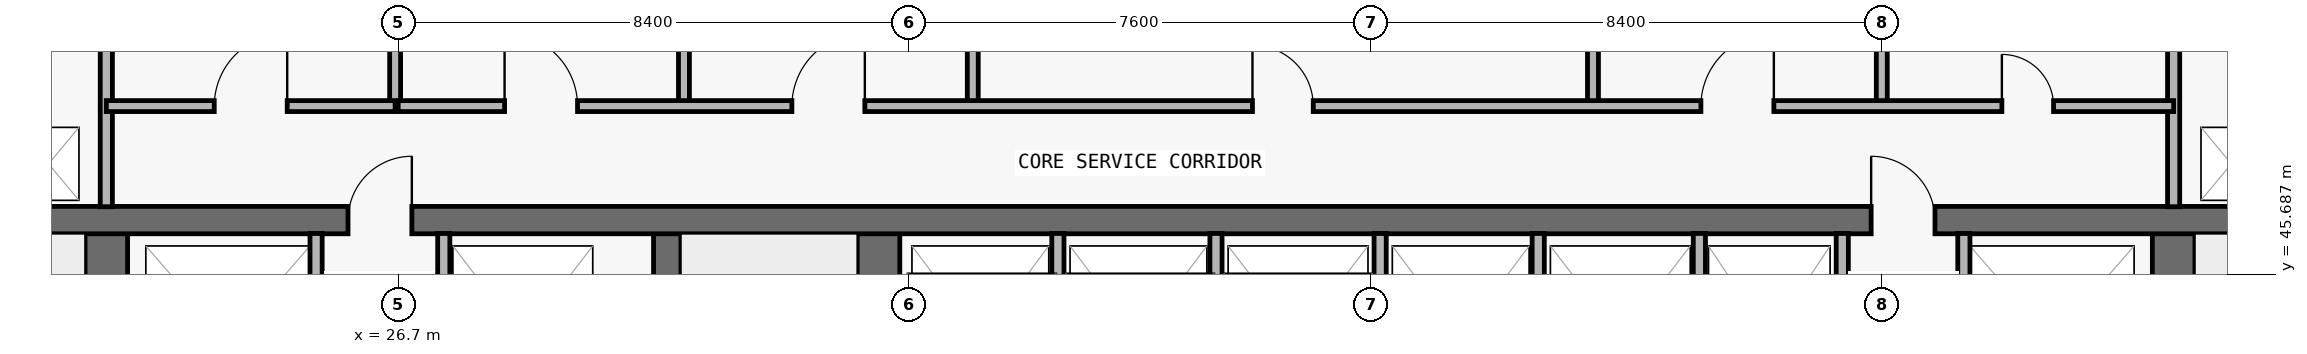
"""IFC4 building model, lengths in metres.
Left out: names, types, materials, properties, quantities, classifications, styles, units other than length and angle.
Written with IfcOpenShell. Run it as: python <this file> out.ifc"""

import sys

from ifc_helpers import new_model, si_unit, direction, frame, frame_2d, origin, place, context, subcontext, project, spatial, rectangle, extrude, element, fill, save


model = new_model("IFC4")
c1 = context("Model", 3, precision=1e-05, world=origin(), true_north=direction((0.0, 1.0)))
c2 = subcontext(c1, "Body", "Model", "MODEL_VIEW")
j1 = project(units=[si_unit("LENGTHUNIT", "METRE"), si_unit("PLANEANGLEUNIT", "RADIAN")], contexts=[c1])
p1 = place(None, origin())
s1 = spatial("IfcSite", under=j1, at=p1, CompositionType="ELEMENT")
p2 = place(p1, origin())
s2 = spatial("IfcBuilding", under=s1, at=p2, CompositionType="ELEMENT")
p3 = place(p2, frame((0.0, 0.0, 24.6)))
s3 = spatial("IfcBuildingStorey", under=s2, at=p3, CompositionType="ELEMENT", Elevation=24.6)
p4 = place(p3, frame((21.9, 36.9, 0.0), z_axis=(0.0, 0.0, 1.0), x_axis=(0.0, 1.0, 0.0)))
e1 = element("IfcWall", 1, at=p4, inside=s3, PredefinedType="SHEAR", context=c2, shape_type="SweptSolid", body=[
    extrude(rectangle(XDim=9.675, YDim=0.7, at=frame_2d((4.837, 0.0))), origin(), (0.0, 0.0, 1.0), 5.15),
])
p5 = place(p4, frame((0.65, 0.0, 0.0)))
e2 = element("IfcOpeningElement", 2, at=p5, cuts=e1, PredefinedType="OPENING", context=c2, shape_type="SweptSolid", body=[
    extrude(rectangle(XDim=1.1, YDim=2.15, at=frame_2d((0.55, 1.075))), frame((0.0, 0.36, 0.0), z_axis=(0.0, -1.0, 0.0), x_axis=(1.0, 0.0, 0.0)), (0.0, 0.0, 1.0), 0.72),
])
p6 = place(p3, frame((55.9, 36.9, 0.0), z_axis=(0.0, 0.0, 1.0), x_axis=(0.0, 1.0, 0.0)))
e3 = element("IfcWall", 3, at=p6, inside=s3, PredefinedType="SHEAR", context=c2, shape_type="SweptSolid", body=[
    extrude(rectangle(XDim=9.675, YDim=0.7, at=frame_2d((4.837, 0.0))), origin(), (0.0, 0.0, 1.0), 5.15),
])
p7 = place(p6, frame((0.65, 0.0, 0.0)))
e4 = element("IfcOpeningElement", 4, at=p7, cuts=e3, PredefinedType="OPENING", context=c2, shape_type="SweptSolid", body=[
    extrude(rectangle(XDim=1.1, YDim=2.15, at=frame_2d((0.55, 1.075))), frame((0.0, 0.36, 0.0), z_axis=(0.0, -1.0, 0.0), x_axis=(1.0, 0.0, 0.0)), (0.0, 0.0, 1.0), 0.72),
])
p8 = place(p3, frame((31.125, 36.9, 0.0), z_axis=(0.0, 0.0, 1.0), x_axis=(0.0, 1.0, 0.0)))
e5 = element("IfcWall", 5, at=p8, inside=s3, PredefinedType="SHEAR", context=c2, shape_type="SweptSolid", body=[
    extrude(rectangle(XDim=9.675, YDim=0.45, at=frame_2d((4.837, 0.0))), origin(), (0.0, 0.0, 1.0), 5.15),
])
p9 = place(p3, frame((34.6, 36.9, 0.0), z_axis=(0.0, 0.0, 1.0), x_axis=(0.0, 1.0, 0.0)))
e6 = element("IfcWall", 6, at=p9, inside=s3, PredefinedType="SHEAR", context=c2, shape_type="SweptSolid", body=[
    extrude(rectangle(XDim=9.675, YDim=0.7, at=frame_2d((4.837, 0.0))), origin(), (0.0, 0.0, 1.0), 5.15),
])
p10 = place(p3, frame((18.2, 46.575, 0.0), z_axis=(0.0, 0.0, 1.0), x_axis=(1.0, 0.0, 0.0)))
e7 = element("IfcWall", 7, at=p10, inside=s3, PredefinedType="SHEAR", context=c2, shape_type="SweptSolid", body=[
    extrude(rectangle(XDim=41.4, YDim=0.45, at=frame_2d((20.7, 0.0))), origin(), (0.0, 0.0, 1.0), 5.15),
])
p11 = place(p10, frame((7.675, 0.0, 0.0)))
e8 = element("IfcOpeningElement", 8, at=p11, cuts=e7, PredefinedType="OPENING", context=c2, shape_type="SweptSolid", body=[
    extrude(rectangle(XDim=1.05, YDim=2.15, at=frame_2d((0.525, 1.075))), frame((0.0, 0.235, 0.0), z_axis=(0.0, -1.0, 0.0), x_axis=(1.0, 0.0, 0.0)), (0.0, 0.0, 1.0), 0.47),
])
p12 = place(p10, frame((32.725, 0.0, 0.0)))
e9 = element("IfcOpeningElement", 9, at=p12, cuts=e7, PredefinedType="OPENING", context=c2, shape_type="SweptSolid", body=[
    extrude(rectangle(XDim=1.05, YDim=2.15, at=frame_2d((0.525, 1.075))), frame((0.0, 0.235, 0.0), z_axis=(0.0, -1.0, 0.0), x_axis=(1.0, 0.0, 0.0)), (0.0, 0.0, 1.0), 0.47),
])
p13 = place(p3, frame((21.9, 46.795, 0.0), z_axis=(0.0, 0.0, 1.0), x_axis=(0.0, 1.0, 0.0)))
e10 = element("IfcWall", 10, at=p13, inside=s3, PredefinedType="PARTITIONING", context=c2, shape_type="SweptSolid", body=[
    extrude(rectangle(XDim=3.06, YDim=0.2, at=frame_2d((1.53, 0.0))), origin(), (0.0, 0.0, 1.0), 5.15),
])
p14 = place(p3, frame((25.35, 43.17, 0.0), z_axis=(0.0, 0.0, 1.0), x_axis=(0.0, 1.0, 0.0)))
e11 = element("IfcWall", 11, at=p14, inside=s3, PredefinedType="PARTITIONING", context=c2, shape_type="SweptSolid", body=[
    extrude(rectangle(XDim=3.185, YDim=0.2, at=frame_2d((1.593, 0.0))), origin(), (0.0, 0.0, 1.0), 5.15),
])
p15 = place(p3, frame((26.65, 48.45, 0.0), z_axis=(0.0, 0.0, 1.0), x_axis=(0.0, 1.0, 0.0)))
e12 = element("IfcWall", 12, at=p15, inside=s3, PredefinedType="PARTITIONING", context=c2, shape_type="SweptSolid", body=[
    extrude(rectangle(XDim=1.405, YDim=0.18, at=frame_2d((0.703, 0.0))), origin(), (0.0, 0.0, 1.0), 5.15),
])
p16 = place(p3, frame((27.45, 43.17, 0.0), z_axis=(0.0, 0.0, 1.0), x_axis=(0.0, 1.0, 0.0)))
e13 = element("IfcWall", 13, at=p16, inside=s3, PredefinedType="PARTITIONING", context=c2, shape_type="SweptSolid", body=[
    extrude(rectangle(XDim=3.185, YDim=0.2, at=frame_2d((1.593, 0.0))), origin(), (0.0, 0.0, 1.0), 5.15),
])
for number, where, z_axis, x_axis in (
    (14, (31.4, 48.45, 0.0), (0.0, 0.0, 1.0), (0.0, 1.0, 0.0)),
    (15, (36.15, 48.45, 0.0), (0.0, 0.0, 1.0), (0.0, 1.0, 0.0)),
):
    element("IfcWall", number, at=place(p3, frame(where, z_axis=z_axis, x_axis=x_axis)), inside=s3, PredefinedType="PARTITIONING", context=c2, shape_type="SweptSolid", body=[
        extrude(rectangle(XDim=1.405, YDim=0.18, at=frame_2d((0.703, 0.0))), origin(), (0.0, 0.0, 1.0), 5.15),
    ])
for number, where, z_axis, x_axis in (
    (16, (37.55, 43.17, 0.0), (0.0, 0.0, 1.0), (0.0, 1.0, 0.0)),
    (17, (40.15, 43.17, 0.0), (0.0, 0.0, 1.0), (0.0, 1.0, 0.0)),
    (18, (42.85, 43.17, 0.0), (0.0, 0.0, 1.0), (0.0, 1.0, 0.0)),
    (19, (45.45, 43.17, 0.0), (0.0, 0.0, 1.0), (0.0, 1.0, 0.0)),
):
    element("IfcWall", number, at=place(p3, frame(where, z_axis=z_axis, x_axis=x_axis)), inside=s3, PredefinedType="PARTITIONING", context=c2, shape_type="SweptSolid", body=[
        extrude(rectangle(XDim=3.185, YDim=0.2, at=frame_2d((1.593, 0.0))), origin(), (0.0, 0.0, 1.0), 5.15),
    ])
p17 = place(p3, frame((46.35, 48.45, 0.0), z_axis=(0.0, 0.0, 1.0), x_axis=(0.0, 1.0, 0.0)))
e20 = element("IfcWall", 20, at=p17, inside=s3, PredefinedType="PARTITIONING", context=c2, shape_type="SweptSolid", body=[
    extrude(rectangle(XDim=1.405, YDim=0.18, at=frame_2d((0.703, 0.0))), origin(), (0.0, 0.0, 1.0), 5.15),
])
for number, where, z_axis, x_axis in (
    (21, (48.1, 43.17, 0.0), (0.0, 0.0, 1.0), (0.0, 1.0, 0.0)),
    (22, (50.45, 43.17, 0.0), (0.0, 0.0, 1.0), (0.0, 1.0, 0.0)),
):
    element("IfcWall", number, at=place(p3, frame(where, z_axis=z_axis, x_axis=x_axis)), inside=s3, PredefinedType="PARTITIONING", context=c2, shape_type="SweptSolid", body=[
        extrude(rectangle(XDim=3.185, YDim=0.2, at=frame_2d((1.593, 0.0))), origin(), (0.0, 0.0, 1.0), 5.15),
    ])
p18 = place(p3, frame((51.1, 48.45, 0.0), z_axis=(0.0, 0.0, 1.0), x_axis=(0.0, 1.0, 0.0)))
e23 = element("IfcWall", 23, at=p18, inside=s3, PredefinedType="PARTITIONING", context=c2, shape_type="SweptSolid", body=[
    extrude(rectangle(XDim=1.405, YDim=0.18, at=frame_2d((0.703, 0.0))), origin(), (0.0, 0.0, 1.0), 5.15),
])
p19 = place(p3, frame((52.45, 43.17, 0.0), z_axis=(0.0, 0.0, 1.0), x_axis=(0.0, 1.0, 0.0)))
e24 = element("IfcWall", 24, at=p19, inside=s3, PredefinedType="PARTITIONING", context=c2, shape_type="SweptSolid", body=[
    extrude(rectangle(XDim=3.185, YDim=0.2, at=frame_2d((1.593, 0.0))), origin(), (0.0, 0.0, 1.0), 5.15),
])
p20 = place(p3, frame((55.9, 46.795, 0.0), z_axis=(0.0, 0.0, 1.0), x_axis=(0.0, 1.0, 0.0)))
e25 = element("IfcWall", 25, at=p20, inside=s3, PredefinedType="PARTITIONING", context=c2, shape_type="SweptSolid", body=[
    extrude(rectangle(XDim=3.06, YDim=0.2, at=frame_2d((1.53, 0.0))), origin(), (0.0, 0.0, 1.0), 5.15),
])
p21 = place(p3, frame((21.9, 48.45, 0.0), z_axis=(0.0, 0.0, 1.0), x_axis=(1.0, 0.0, 0.0)))
e26 = element("IfcWall", 26, at=p21, inside=s3, PredefinedType="PARTITIONING", context=c2, shape_type="SweptSolid", body=[
    extrude(rectangle(XDim=4.75, YDim=0.18, at=frame_2d((2.375, 0.0))), origin(), (0.0, 0.0, 1.0), 5.15),
])
p22 = place(p21, frame((1.775, 0.0, 0.0)))
e27 = element("IfcOpeningElement", 27, at=p22, cuts=e26, PredefinedType="OPENING", context=c2, shape_type="SweptSolid", body=[
    extrude(rectangle(XDim=1.2, YDim=2.2, at=frame_2d((0.6, 1.1))), frame((0.0, 0.1, 0.0), z_axis=(0.0, -1.0, 0.0), x_axis=(1.0, 0.0, 0.0)), (0.0, 0.0, 1.0), 0.2),
])
p23 = place(p3, frame((26.7, 48.45, 0.0), z_axis=(0.0, 0.0, 1.0), x_axis=(1.0, 0.0, 0.0)))
e28 = element("IfcWall", 28, at=p23, inside=s3, PredefinedType="PARTITIONING", context=c2, shape_type="SweptSolid", body=[
    extrude(rectangle(XDim=29.2, YDim=0.18, at=frame_2d((14.6, 0.0))), origin(), (0.0, 0.0, 1.0), 5.15),
])
p24 = place(p23, frame((1.75, 0.0, 0.0)))
e29 = element("IfcOpeningElement", 29, at=p24, cuts=e28, PredefinedType="OPENING", context=c2, shape_type="SweptSolid", body=[
    extrude(rectangle(XDim=1.2, YDim=2.2, at=frame_2d((0.6, 1.1))), frame((0.0, 0.1, 0.0), z_axis=(0.0, -1.0, 0.0), x_axis=(1.0, 0.0, 0.0)), (0.0, 0.0, 1.0), 0.2),
])
p25 = place(p23, frame((6.475, 0.0, 0.0)))
e30 = element("IfcOpeningElement", 30, at=p25, cuts=e28, PredefinedType="OPENING", context=c2, shape_type="SweptSolid", body=[
    extrude(rectangle(XDim=1.2, YDim=2.2, at=frame_2d((0.6, 1.1))), frame((0.0, 0.1, 0.0), z_axis=(0.0, -1.0, 0.0), x_axis=(1.0, 0.0, 0.0)), (0.0, 0.0, 1.0), 0.2),
])
p26 = place(p23, frame((14.05, 0.0, 0.0)))
e31 = element("IfcOpeningElement", 31, at=p26, cuts=e28, PredefinedType="OPENING", context=c2, shape_type="SweptSolid", body=[
    extrude(rectangle(XDim=1.0, YDim=2.2, at=frame_2d((0.5, 1.1))), frame((0.0, 0.1, 0.0), z_axis=(0.0, -1.0, 0.0), x_axis=(1.0, 0.0, 0.0)), (0.0, 0.0, 1.0), 0.2),
])
p27 = place(p23, frame((21.425, 0.0, 0.0)))
e32 = element("IfcOpeningElement", 32, at=p27, cuts=e28, PredefinedType="OPENING", context=c2, shape_type="SweptSolid", body=[
    extrude(rectangle(XDim=1.2, YDim=2.2, at=frame_2d((0.6, 1.1))), frame((0.0, 0.1, 0.0), z_axis=(0.0, -1.0, 0.0), x_axis=(1.0, 0.0, 0.0)), (0.0, 0.0, 1.0), 0.2),
])
p28 = place(p23, frame((26.375, 0.0, 0.0)))
e33 = element("IfcOpeningElement", 33, at=p28, cuts=e28, PredefinedType="OPENING", context=c2, shape_type="SweptSolid", body=[
    extrude(rectangle(XDim=0.85, YDim=2.1, at=frame_2d((0.425, 1.05))), frame((0.0, 0.1, 0.0), z_axis=(0.0, -1.0, 0.0), x_axis=(1.0, 0.0, 0.0)), (0.0, 0.0, 1.0), 0.2),
])
p29 = place(p11, origin())
e34 = element("IfcDoor", 34, at=p29, inside=s3, OperationType="SINGLE_SWING_RIGHT", PredefinedType="DOOR", context=c2, shape_type="SweptSolid", body=[
    extrude(rectangle(XDim=1.05, YDim=2.15, at=frame_2d((0.525, 1.075))), frame((0.0, 0.025, 0.0), z_axis=(0.0, -1.0, 0.0), x_axis=(1.0, 0.0, 0.0)), (0.0, 0.0, 1.0), 0.05),
])
fill(e8, e34)
p30 = place(p12, origin())
e35 = element("IfcDoor", 35, at=p30, inside=s3, OperationType="SINGLE_SWING_LEFT", PredefinedType="DOOR", context=c2, shape_type="SweptSolid", body=[
    extrude(rectangle(XDim=1.05, YDim=2.15, at=frame_2d((0.525, 1.075))), frame((0.0, 0.025, 0.0), z_axis=(0.0, -1.0, 0.0), x_axis=(1.0, 0.0, 0.0)), (0.0, 0.0, 1.0), 0.05),
])
fill(e9, e35)
p31 = place(p22, origin())
e36 = element("IfcDoor", 36, at=p31, inside=s3, OperationType="SINGLE_SWING_RIGHT", PredefinedType="DOOR", context=c2, shape_type="SweptSolid", body=[
    extrude(rectangle(XDim=1.2, YDim=2.2, at=frame_2d((0.6, 1.1))), frame((0.0, 0.025, 0.0), z_axis=(0.0, -1.0, 0.0), x_axis=(1.0, 0.0, 0.0)), (0.0, 0.0, 1.0), 0.05),
])
fill(e27, e36)
p32 = place(p24, origin())
e37 = element("IfcDoor", 37, at=p32, inside=s3, OperationType="SINGLE_SWING_LEFT", PredefinedType="DOOR", context=c2, shape_type="SweptSolid", body=[
    extrude(rectangle(XDim=1.2, YDim=2.2, at=frame_2d((0.6, 1.1))), frame((0.0, 0.025, 0.0), z_axis=(0.0, -1.0, 0.0), x_axis=(1.0, 0.0, 0.0)), (0.0, 0.0, 1.0), 0.05),
])
fill(e29, e37)
p33 = place(p25, origin())
e38 = element("IfcDoor", 38, at=p33, inside=s3, OperationType="SINGLE_SWING_RIGHT", PredefinedType="DOOR", context=c2, shape_type="SweptSolid", body=[
    extrude(rectangle(XDim=1.2, YDim=2.2, at=frame_2d((0.6, 1.1))), frame((0.0, 0.025, 0.0), z_axis=(0.0, -1.0, 0.0), x_axis=(1.0, 0.0, 0.0)), (0.0, 0.0, 1.0), 0.05),
])
fill(e30, e38)
p34 = place(p26, origin())
e39 = element("IfcDoor", 39, at=p34, inside=s3, OperationType="SINGLE_SWING_LEFT", PredefinedType="DOOR", context=c2, shape_type="SweptSolid", body=[
    extrude(rectangle(XDim=1.0, YDim=2.2, at=frame_2d((0.5, 1.1))), frame((0.0, 0.025, 0.0), z_axis=(0.0, -1.0, 0.0), x_axis=(1.0, 0.0, 0.0)), (0.0, 0.0, 1.0), 0.05),
])
fill(e31, e39)
p35 = place(p27, origin())
e40 = element("IfcDoor", 40, at=p35, inside=s3, OperationType="SINGLE_SWING_RIGHT", PredefinedType="DOOR", context=c2, shape_type="SweptSolid", body=[
    extrude(rectangle(XDim=1.2, YDim=2.2, at=frame_2d((0.6, 1.1))), frame((0.0, 0.025, 0.0), z_axis=(0.0, -1.0, 0.0), x_axis=(1.0, 0.0, 0.0)), (0.0, 0.0, 1.0), 0.05),
])
fill(e32, e40)
p36 = place(p28, origin())
e41 = element("IfcDoor", 41, at=p36, inside=s3, OperationType="SINGLE_SWING_LEFT", PredefinedType="DOOR", context=c2, shape_type="SweptSolid", body=[
    extrude(rectangle(XDim=0.85, YDim=2.1, at=frame_2d((0.425, 1.05))), frame((0.0, 0.025, 0.0), z_axis=(0.0, -1.0, 0.0), x_axis=(1.0, 0.0, 0.0)), (0.0, 0.0, 1.0), 0.05),
])
fill(e33, e41)
save(model, sys.argv[1])
